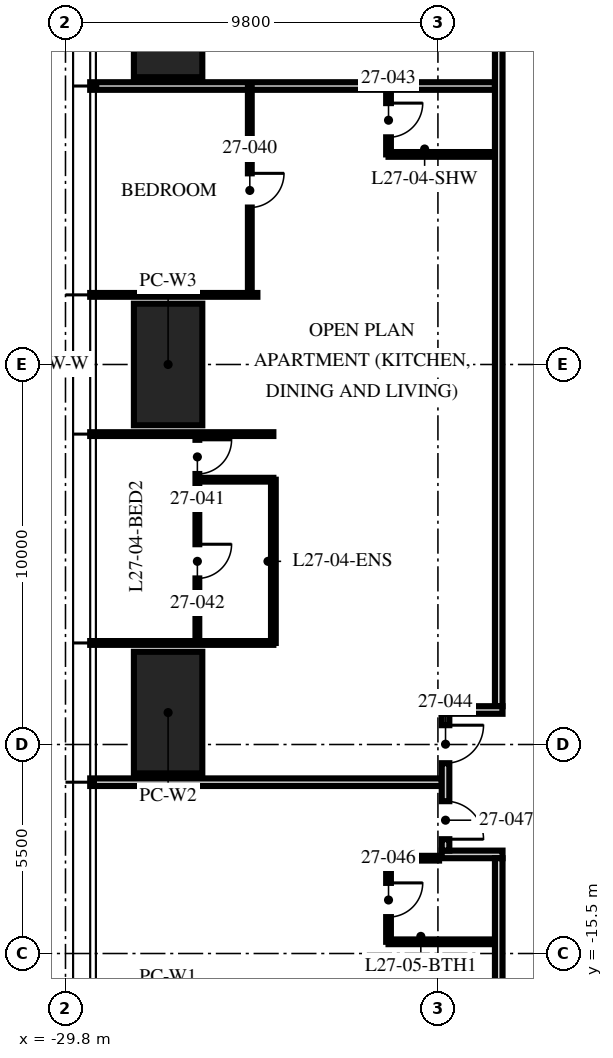
"""IFC4 building model, lengths in metres.
Left out: names, types, materials, properties, quantities, classifications, styles, units other than length and angle.
Written with IfcOpenShell. Run it as: python <this file> out.ifc"""

import sys

from ifc_helpers import new_model, si_unit, direction, frame, frame_2d, origin, origin_2d, place, context, subcontext, project, spatial, rectangle, hollow_rectangle, extrude, element, fill, save


model = new_model("IFC4")
c1 = context("Model", 3, precision=1e-05, world=origin(), true_north=direction((0.0, 1.0)))
c2 = subcontext(c1, "Body", "Model", "MODEL_VIEW")
j1 = project(units=[si_unit("LENGTHUNIT", "METRE"), si_unit("PLANEANGLEUNIT", "RADIAN")], contexts=[c1])
p1 = place(None, origin())
s1 = spatial("IfcSite", under=j1, at=p1, CompositionType="ELEMENT")
p2 = place(p1, origin())
s2 = spatial("IfcBuilding", under=s1, at=p2, CompositionType="ELEMENT")
p3 = place(p2, frame((0.0, 0.0, 111.0)))
s3 = spatial("IfcBuildingStorey", under=s2, at=p3, CompositionType="ELEMENT", Elevation=111.0)
for number, where, z_axis, x_axis in (
    (1, (-27.1, -9.16, 0.0), (0.0, 0.0, 1.0), (0.0, 1.0, 0.0)),
    (2, (-27.1, 0.0, 0.0), (0.0, 0.0, 1.0), (0.0, 1.0, 0.0)),
    (3, (-27.1, 9.16, 0.0), (0.0, 0.0, 1.0), (0.0, 1.0, 0.0)),
):
    element("IfcColumn", number, at=place(p3, frame(where, z_axis=z_axis, x_axis=x_axis)), inside=s3, PredefinedType="COLUMN", context=c2, shape_type="SweptSolid", body=[
        extrude(hollow_rectangle(XDim=3.2, YDim=1.8, WallThickness=0.2, at=origin_2d()), origin(), (0.0, 0.0, 1.0), 3.75),
    ])
p4 = place(p3, frame((-18.5, 7.328, 0.0), z_axis=(0.0, 0.0, 1.0), x_axis=(-1.0, 0.0, 0.0)))
e4 = element("IfcWall", 4, at=p4, inside=s3, PredefinedType="PARTITIONING", context=c2, shape_type="SweptSolid", body=[
    extrude(rectangle(XDim=10.65, YDim=0.2, at=frame_2d((5.325, 0.0))), origin(), (0.0, 0.0, 1.0), 2.81),
])
p5 = place(p3, frame((-24.75, 1.832, 0.0), z_axis=(0.0, 0.0, 1.0), x_axis=(-1.0, 0.0, 0.0)))
e5 = element("IfcWall", 5, at=p5, inside=s3, PredefinedType="PARTITIONING", context=c2, shape_type="SweptSolid", body=[
    extrude(rectangle(XDim=4.4, YDim=0.1, at=frame_2d((2.2, 0.0))), origin(), (0.0, 0.0, 1.0), 2.81),
])
for number, where, z_axis, x_axis in (
    (6, (-24.33, -1.832, 0.0), (0.0, 0.0, 1.0), (-1.0, 0.0, 0.0)),
    (7, (-24.33, -7.328, 0.0), (0.0, 0.0, 1.0), (-1.0, 0.0, 0.0)),
):
    element("IfcWall", number, at=place(p3, frame(where, z_axis=z_axis, x_axis=x_axis)), inside=s3, PredefinedType="PARTITIONING", context=c2, shape_type="SweptSolid", body=[
        extrude(rectangle(XDim=4.82, YDim=0.1, at=frame_2d((2.41, 0.0))), origin(), (0.0, 0.0, 1.0), 2.81),
    ])
p6 = place(p3, frame((-19.9, -10.992, 0.0), z_axis=(0.0, 0.0, 1.0), x_axis=(-1.0, 0.0, 0.0)))
e8 = element("IfcWall", 8, at=p6, inside=s3, PredefinedType="PARTITIONING", context=c2, shape_type="SweptSolid", body=[
    extrude(rectangle(XDim=9.25, YDim=0.2, at=frame_2d((4.625, 0.0))), origin(), (0.0, 0.0, 1.0), 2.81),
])
p7 = place(p3, frame((-24.95, 7.328, 0.0), z_axis=(0.0, 0.0, 1.0), x_axis=(0.0, -1.0, 0.0)))
e9 = element("IfcWall", 9, at=p7, inside=s3, PredefinedType="PARTITIONING", context=c2, shape_type="SweptSolid", body=[
    extrude(rectangle(XDim=5.496, YDim=0.1, at=frame_2d((2.748, 0.0))), origin(), (0.0, 0.0, 1.0), 2.81),
])
p8 = place(p7, frame((2.298, 0.0, 0.0)))
e10 = element("IfcOpeningElement", 10, at=p8, cuts=e9, PredefinedType="OPENING", context=c2, shape_type="SweptSolid", body=[
    extrude(rectangle(XDim=0.9, YDim=2.1, at=frame_2d((0.45, 1.05))), frame((0.0, 0.06, 0.0), z_axis=(0.0, -1.0, 0.0), x_axis=(1.0, 0.0, 0.0)), (0.0, 0.0, 1.0), 0.12),
])
p9 = place(p3, frame((-26.33, -1.832, 0.0), z_axis=(0.0, 0.0, 1.0), x_axis=(0.0, -1.0, 0.0)))
e11 = element("IfcWall", 11, at=p9, inside=s3, PredefinedType="PARTITIONING", context=c2, shape_type="SweptSolid", body=[
    extrude(rectangle(XDim=5.496, YDim=0.1, at=frame_2d((2.748, 0.0))), origin(), (0.0, 0.0, 1.0), 2.81),
])
p10 = place(p9, frame((0.15, 0.0, 0.0)))
e12 = element("IfcOpeningElement", 12, at=p10, cuts=e11, PredefinedType="OPENING", context=c2, shape_type="SweptSolid", body=[
    extrude(rectangle(XDim=0.9, YDim=2.1, at=frame_2d((0.45, 1.05))), frame((0.0, 0.06, 0.0), z_axis=(0.0, -1.0, 0.0), x_axis=(1.0, 0.0, 0.0)), (0.0, 0.0, 1.0), 0.12),
])
p11 = place(p9, frame((2.898, 0.0, 0.0)))
e13 = element("IfcOpeningElement", 13, at=p11, cuts=e11, PredefinedType="OPENING", context=c2, shape_type="SweptSolid", body=[
    extrude(rectangle(XDim=0.9, YDim=2.1, at=frame_2d((0.45, 1.05))), frame((0.0, 0.06, 0.0), z_axis=(0.0, -1.0, 0.0), x_axis=(1.0, 0.0, 0.0)), (0.0, 0.0, 1.0), 0.12),
])
p12 = place(p3, frame((-24.33, -3.032, 0.0), z_axis=(0.0, 0.0, 1.0), x_axis=(-1.0, 0.0, 0.0)))
e14 = element("IfcWall", 14, at=p12, inside=s3, PredefinedType="PARTITIONING", context=c2, shape_type="SweptSolid", body=[
    extrude(rectangle(XDim=2.0, YDim=0.1, at=frame_2d((1.0, 0.0))), origin(), (0.0, 0.0, 1.0), 3.5),
])
p13 = place(p3, frame((-24.33, -3.032, 0.0), z_axis=(0.0, 0.0, 1.0), x_axis=(0.0, -1.0, 0.0)))
e15 = element("IfcWall", 15, at=p13, inside=s3, PredefinedType="PARTITIONING", context=c2, shape_type="SweptSolid", body=[
    extrude(rectangle(XDim=4.296, YDim=0.125, at=frame_2d((2.148, 0.0))), origin(), (0.0, 0.0, 1.0), 2.81),
])
p14 = place(p3, frame((-21.3, 7.328, 0.0), z_axis=(0.0, 0.0, 1.0), x_axis=(0.0, -1.0, 0.0)))
e16 = element("IfcWall", 16, at=p14, inside=s3, PredefinedType="PARTITIONING", context=c2, shape_type="SweptSolid", body=[
    extrude(rectangle(XDim=1.8, YDim=0.125, at=frame_2d((0.9, 0.0))), origin(), (0.0, 0.0, 1.0), 3.5),
])
p15 = place(p14, frame((0.45, 0.0, 0.0)))
e17 = element("IfcOpeningElement", 17, at=p15, cuts=e16, PredefinedType="OPENING", context=c2, shape_type="SweptSolid", body=[
    extrude(rectangle(XDim=0.9, YDim=2.1, at=frame_2d((0.45, 1.05))), frame((0.0, 0.073, 0.0), z_axis=(0.0, -1.0, 0.0), x_axis=(1.0, 0.0, 0.0)), (0.0, 0.0, 1.0), 0.145),
])
p16 = place(p3, frame((-18.5, 5.528, 0.0), z_axis=(0.0, 0.0, 1.0), x_axis=(-1.0, 0.0, 0.0)))
e18 = element("IfcWall", 18, at=p16, inside=s3, PredefinedType="PARTITIONING", context=c2, shape_type="SweptSolid", body=[
    extrude(rectangle(XDim=2.8, YDim=0.125, at=frame_2d((1.4, 0.0))), origin(), (0.0, 0.0, 1.0), 3.5),
])
p17 = place(p3, frame((-21.3, -12.992, 0.0), z_axis=(0.0, 0.0, 1.0), x_axis=(0.0, -1.0, 0.0)))
e19 = element("IfcWall", 19, at=p17, inside=s3, PredefinedType="PARTITIONING", context=c2, shape_type="SweptSolid", body=[
    extrude(rectangle(XDim=2.2, YDim=0.125, at=frame_2d((1.1, 0.0))), origin(), (0.0, 0.0, 1.0), 2.81),
])
p18 = place(p17, frame((0.65, 0.0, 0.0)))
e20 = element("IfcOpeningElement", 20, at=p18, cuts=e19, PredefinedType="OPENING", context=c2, shape_type="SweptSolid", body=[
    extrude(rectangle(XDim=0.9, YDim=2.1, at=frame_2d((0.45, 1.05))), frame((0.0, 0.073, 0.0), z_axis=(0.0, -1.0, 0.0), x_axis=(1.0, 0.0, 0.0)), (0.0, 0.0, 1.0), 0.145),
])
p19 = place(p3, frame((-19.97, -12.992, 0.0), z_axis=(0.0, 0.0, 1.0), x_axis=(-1.0, 0.0, 0.0)))
e21 = element("IfcWall", 21, at=p19, inside=s3, PredefinedType="PARTITIONING", context=c2, shape_type="SweptSolid", body=[
    extrude(rectangle(XDim=1.33, YDim=0.125, at=frame_2d((0.665, 0.0))), origin(), (0.0, 0.0, 1.0), 3.5),
])
p20 = place(p3, frame((-18.5, -15.192, 0.0), z_axis=(0.0, 0.0, 1.0), x_axis=(-1.0, 0.0, 0.0)))
e22 = element("IfcWall", 22, at=p20, inside=s3, PredefinedType="PARTITIONING", context=c2, shape_type="SweptSolid", body=[
    extrude(rectangle(XDim=2.8, YDim=0.125, at=frame_2d((1.4, 0.0))), origin(), (0.0, 0.0, 1.0), 3.5),
])
p21 = place(p3, frame((-18.4, 18.3, 0.0), z_axis=(0.0, 0.0, 1.0), x_axis=(0.0, -1.0, 0.0)))
e23 = element("IfcWall", 23, at=p21, inside=s3, PredefinedType="PARTITIONING", context=c2, shape_type="SweptSolid", body=[
    extrude(rectangle(XDim=27.292, YDim=0.2, at=frame_2d((13.646, 0.0))), origin(), (0.0, 0.0, 1.0), 2.3),
])
p22 = place(p3, frame((-18.3, -9.092, 0.0), z_axis=(0.0, 0.0, 1.0), x_axis=(-1.0, 0.0, 0.0)))
e24 = element("IfcWall", 24, at=p22, inside=s3, PredefinedType="PARTITIONING", context=c2, shape_type="SweptSolid", body=[
    extrude(rectangle(XDim=1.6, YDim=0.2, at=frame_2d((0.8, 0.0))), origin(), (0.0, 0.0, 1.0), 2.7),
])
p23 = place(p3, frame((-18.3, -12.892, 0.0), z_axis=(0.0, 0.0, 1.0), x_axis=(-1.0, 0.0, 0.0)))
e25 = element("IfcWall", 25, at=p23, inside=s3, PredefinedType="PARTITIONING", context=c2, shape_type="SweptSolid", body=[
    extrude(rectangle(XDim=1.6, YDim=0.2, at=frame_2d((0.8, 0.0))), origin(), (0.0, 0.0, 1.0), 3.5),
])
p24 = place(p3, frame((-19.8, -9.192, 0.0), z_axis=(0.0, 0.0, 1.0), x_axis=(0.0, -1.0, 0.0)))
e26 = element("IfcWall", 26, at=p24, inside=s3, PredefinedType="PARTITIONING", context=c2, shape_type="SweptSolid", body=[
    extrude(rectangle(XDim=3.6, YDim=0.2, at=frame_2d((1.8, 0.0))), origin(), (0.0, 0.0, 1.0), 2.7),
])
p25 = place(p24, frame((0.3, 0.0, 0.0)))
e27 = element("IfcOpeningElement", 27, at=p25, cuts=e26, PredefinedType="OPENING", context=c2, shape_type="SweptSolid", body=[
    extrude(rectangle(XDim=1.0, YDim=2.2, at=frame_2d((0.5, 1.1))), frame((0.0, 0.11, 0.0), z_axis=(0.0, -1.0, 0.0), x_axis=(1.0, 0.0, 0.0)), (0.0, 0.0, 1.0), 0.22),
])
p26 = place(p24, frame((2.3, 0.0, 0.0)))
e28 = element("IfcOpeningElement", 28, at=p26, cuts=e26, PredefinedType="OPENING", context=c2, shape_type="SweptSolid", body=[
    extrude(rectangle(XDim=1.0, YDim=2.2, at=frame_2d((0.5, 1.1))), frame((0.0, 0.11, 0.0), z_axis=(0.0, -1.0, 0.0), x_axis=(1.0, 0.0, 0.0)), (0.0, 0.0, 1.0), 0.22),
])
p27 = place(p3, frame((-18.4, -12.992, 0.0), z_axis=(0.0, 0.0, 1.0), x_axis=(0.0, -1.0, 0.0)))
e29 = element("IfcWall", 29, at=p27, inside=s3, PredefinedType="PARTITIONING", context=c2, shape_type="SweptSolid", body=[
    extrude(rectangle(XDim=5.308, YDim=0.2, at=frame_2d((2.654, 0.0))), origin(), (0.0, 0.0, 1.0), 2.3),
])
p28 = place(p8, origin())
e30 = element("IfcDoor", 30, at=p28, inside=s3, OperationType="SINGLE_SWING_LEFT", PredefinedType="DOOR", context=c2, shape_type="SweptSolid", body=[
    extrude(rectangle(XDim=0.9, YDim=2.1, at=frame_2d((0.45, 1.05))), frame((0.0, 0.025, 0.0), z_axis=(0.0, -1.0, 0.0), x_axis=(1.0, 0.0, 0.0)), (0.0, 0.0, 1.0), 0.05),
])
fill(e10, e30)
p29 = place(p10, origin())
e31 = element("IfcDoor", 31, at=p29, inside=s3, OperationType="SINGLE_SWING_LEFT", PredefinedType="DOOR", context=c2, shape_type="SweptSolid", body=[
    extrude(rectangle(XDim=0.9, YDim=2.1, at=frame_2d((0.45, 1.05))), frame((0.0, 0.025, 0.0), z_axis=(0.0, -1.0, 0.0), x_axis=(1.0, 0.0, 0.0)), (0.0, 0.0, 1.0), 0.05),
])
fill(e12, e31)
p30 = place(p11, origin())
e32 = element("IfcDoor", 32, at=p30, inside=s3, OperationType="SINGLE_SWING_LEFT", PredefinedType="DOOR", context=c2, shape_type="SweptSolid", body=[
    extrude(rectangle(XDim=0.9, YDim=2.1, at=frame_2d((0.45, 1.05))), frame((0.0, 0.025, 0.0), z_axis=(0.0, -1.0, 0.0), x_axis=(1.0, 0.0, 0.0)), (0.0, 0.0, 1.0), 0.05),
])
fill(e13, e32)
p31 = place(p15, origin())
e33 = element("IfcDoor", 33, at=p31, inside=s3, OperationType="SINGLE_SWING_LEFT", PredefinedType="DOOR", context=c2, shape_type="SweptSolid", body=[
    extrude(rectangle(XDim=0.9, YDim=2.1, at=frame_2d((0.45, 1.05))), frame((0.0, 0.025, 0.0), z_axis=(0.0, -1.0, 0.0), x_axis=(1.0, 0.0, 0.0)), (0.0, 0.0, 1.0), 0.05),
])
fill(e17, e33)
p32 = place(p25, origin())
e34 = element("IfcDoor", 34, at=p32, inside=s3, OperationType="SINGLE_SWING_LEFT", PredefinedType="DOOR", context=c2, shape_type="SweptSolid", body=[
    extrude(rectangle(XDim=1.0, YDim=2.2, at=frame_2d((0.5, 1.1))), frame((0.0, 0.025, 0.0), z_axis=(0.0, -1.0, 0.0), x_axis=(1.0, 0.0, 0.0)), (0.0, 0.0, 1.0), 0.05),
])
fill(e27, e34)
p33 = place(p18, origin())
e35 = element("IfcDoor", 35, at=p33, inside=s3, OperationType="SINGLE_SWING_LEFT", PredefinedType="DOOR", context=c2, shape_type="SweptSolid", body=[
    extrude(rectangle(XDim=0.9, YDim=2.1, at=frame_2d((0.45, 1.05))), frame((0.0, 0.025, 0.0), z_axis=(0.0, -1.0, 0.0), x_axis=(1.0, 0.0, 0.0)), (0.0, 0.0, 1.0), 0.05),
])
fill(e20, e35)
p34 = place(p26, origin())
e36 = element("IfcDoor", 36, at=p34, inside=s3, OperationType="SINGLE_SWING_RIGHT", PredefinedType="DOOR", context=c2, shape_type="SweptSolid", body=[
    extrude(rectangle(XDim=1.0, YDim=2.2, at=frame_2d((0.5, 1.1))), frame((0.0, 0.025, 0.0), z_axis=(0.0, -1.0, 0.0), x_axis=(1.0, 0.0, 0.0)), (0.0, 0.0, 1.0), 0.05),
])
fill(e28, e36)
save(model, sys.argv[1])
